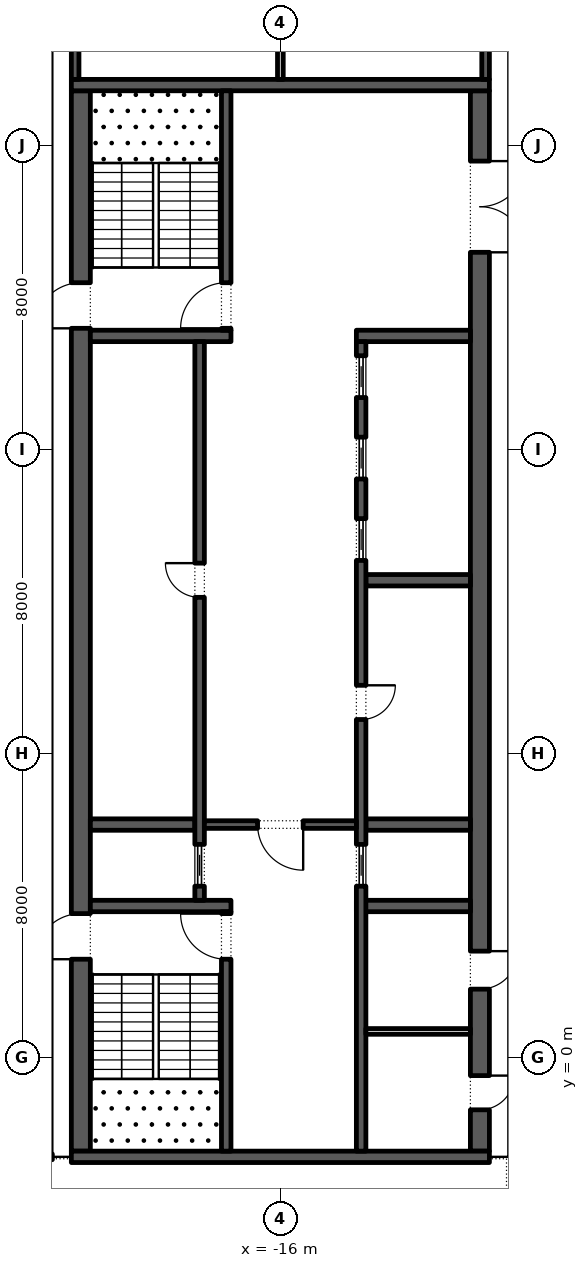
"""IFC4 building model, lengths in metres.
Left out: names, types, materials, properties, quantities, classifications, styles, units other than length and angle.
Written with IfcOpenShell. Run it as: python <this file> out.ifc"""

import sys

from ifc_helpers import new_model, si_unit, direction, frame, frame_2d, origin, place, context, subcontext, project, spatial, rectangle, extrude, element, fill, save


model = new_model("IFC4")
c1 = context("Model", 3, precision=1e-05, world=origin(), true_north=direction((0.0, 1.0)))
c2 = subcontext(c1, "Body", "Model", "MODEL_VIEW")
j1 = project(units=[si_unit("LENGTHUNIT", "METRE"), si_unit("PLANEANGLEUNIT", "RADIAN")], contexts=[c1])
p1 = place(None, origin())
s1 = spatial("IfcSite", under=j1, at=p1, CompositionType="ELEMENT")
p2 = place(p1, origin())
s2 = spatial("IfcBuilding", under=s1, at=p2, CompositionType="ELEMENT")
p3 = place(p2, frame((0.0, 0.0, 330.0)))
s3 = spatial("IfcBuildingStorey", under=s2, at=p3, CompositionType="ELEMENT", Elevation=330.0)
p4 = place(p3, frame((-21.25, -2.45, 0.0), z_axis=(0.0, 0.0, 1.0), x_axis=(0.0, 1.0, 0.0)))
e1 = element("IfcWall", 1, at=p4, inside=s3, PredefinedType="SHEAR", context=c2, shape_type="SweptSolid", body=[
    extrude(rectangle(XDim=27.9, YDim=0.5, at=frame_2d((13.95, 0.0))), origin(), (0.0, 0.0, 1.0), 4.0),
])
p5 = place(p4, frame((5.05, 0.0, 0.0)))
e2 = element("IfcOpeningElement", 2, at=p5, cuts=e1, PredefinedType="OPENING", context=c2, shape_type="SweptSolid", body=[
    extrude(rectangle(XDim=1.2, YDim=2.1, at=frame_2d((0.6, 1.05))), frame((0.0, 0.26, 0.0), z_axis=(0.0, -1.0, 0.0), x_axis=(1.0, 0.0, 0.0)), (0.0, 0.0, 1.0), 0.52),
])
p6 = place(p4, frame((21.65, 0.0, 0.0)))
e3 = element("IfcOpeningElement", 3, at=p6, cuts=e1, PredefinedType="OPENING", context=c2, shape_type="SweptSolid", body=[
    extrude(rectangle(XDim=1.2, YDim=2.1, at=frame_2d((0.6, 1.05))), frame((0.0, 0.26, 0.0), z_axis=(0.0, -1.0, 0.0), x_axis=(1.0, 0.0, 0.0)), (0.0, 0.0, 1.0), 0.52),
])
p7 = place(p3, frame((-10.75, -2.45, 0.0), z_axis=(0.0, 0.0, 1.0), x_axis=(0.0, 1.0, 0.0)))
e4 = element("IfcWall", 4, at=p7, inside=s3, PredefinedType="SHEAR", context=c2, shape_type="SweptSolid", body=[
    extrude(rectangle(XDim=27.9, YDim=0.5, at=frame_2d((13.95, 0.0))), origin(), (0.0, 0.0, 1.0), 4.0),
])
p8 = place(p7, frame((23.65, 0.0, 0.0)))
e5 = element("IfcOpeningElement", 5, at=p8, cuts=e4, PredefinedType="OPENING", context=c2, shape_type="SweptSolid", body=[
    extrude(rectangle(XDim=2.4, YDim=2.1, at=frame_2d((1.2, 1.05))), frame((0.0, 0.26, 0.0), z_axis=(0.0, -1.0, 0.0), x_axis=(1.0, 0.0, 0.0)), (0.0, 0.0, 1.0), 0.52),
])
p9 = place(p7, frame((1.087, 0.0, 0.0)))
e6 = element("IfcOpeningElement", 6, at=p9, cuts=e4, PredefinedType="OPENING", context=c2, shape_type="SweptSolid", body=[
    extrude(rectangle(XDim=0.9, YDim=2.1, at=frame_2d((0.45, 1.05))), frame((0.0, 0.26, 0.0), z_axis=(0.0, -1.0, 0.0), x_axis=(1.0, 0.0, 0.0)), (0.0, 0.0, 1.0), 0.52),
])
p10 = place(p7, frame((4.262, 0.0, 0.0)))
e7 = element("IfcOpeningElement", 7, at=p10, cuts=e4, PredefinedType="OPENING", context=c2, shape_type="SweptSolid", body=[
    extrude(rectangle(XDim=1.0, YDim=2.1, at=frame_2d((0.5, 1.05))), frame((0.0, 0.26, 0.0), z_axis=(0.0, -1.0, 0.0), x_axis=(1.0, 0.0, 0.0)), (0.0, 0.0, 1.0), 0.52),
])
for number, where, z_axis, x_axis in (
    (8, (-21.5, -2.6, 0.0), (0.0, 0.0, 1.0), (1.0, 0.0, 0.0)),
    (9, (-21.5, 25.6, 0.0), (0.0, 0.0, 1.0), (1.0, 0.0, 0.0)),
):
    element("IfcWall", number, at=place(p3, frame(where, z_axis=z_axis, x_axis=x_axis)), inside=s3, PredefinedType="SHEAR", context=c2, shape_type="SweptSolid", body=[
        extrude(rectangle(XDim=11.0, YDim=0.3, at=frame_2d((5.5, 0.0))), origin(), (0.0, 0.0, 1.0), 4.0),
    ])
p11 = place(p3, frame((-21.0, 4.0, 0.0), z_axis=(0.0, 0.0, 1.0), x_axis=(1.0, 0.0, 0.0)))
e10 = element("IfcWall", 10, at=p11, inside=s3, PredefinedType="SHEAR", context=c2, shape_type="SweptSolid", body=[
    extrude(rectangle(XDim=3.7, YDim=0.3, at=frame_2d((1.85, 0.0))), origin(), (0.0, 0.0, 1.0), 4.0),
])
p12 = place(p3, frame((-17.425, -2.45, 0.0), z_axis=(0.0, 0.0, 1.0), x_axis=(0.0, 1.0, 0.0)))
e11 = element("IfcWall", 11, at=p12, inside=s3, PredefinedType="SHEAR", context=c2, shape_type="SweptSolid", body=[
    extrude(rectangle(XDim=6.3, YDim=0.25, at=frame_2d((3.15, 0.0))), origin(), (0.0, 0.0, 1.0), 4.0),
])
p13 = place(p12, frame((5.05, 0.0, 0.0)))
e12 = element("IfcOpeningElement", 12, at=p13, cuts=e11, PredefinedType="OPENING", context=c2, shape_type="SweptSolid", body=[
    extrude(rectangle(XDim=1.2, YDim=2.1, at=frame_2d((0.6, 1.05))), frame((0.0, 0.135, 0.0), z_axis=(0.0, -1.0, 0.0), x_axis=(1.0, 0.0, 0.0)), (0.0, 0.0, 1.0), 0.27),
])
p14 = place(p3, frame((-21.0, 19.0, 0.0), z_axis=(0.0, 0.0, 1.0), x_axis=(1.0, 0.0, 0.0)))
e13 = element("IfcWall", 13, at=p14, inside=s3, PredefinedType="SHEAR", context=c2, shape_type="SweptSolid", body=[
    extrude(rectangle(XDim=3.7, YDim=0.3, at=frame_2d((1.85, 0.0))), origin(), (0.0, 0.0, 1.0), 4.0),
])
p15 = place(p3, frame((-17.425, 19.15, 0.0), z_axis=(0.0, 0.0, 1.0), x_axis=(0.0, 1.0, 0.0)))
e14 = element("IfcWall", 14, at=p15, inside=s3, PredefinedType="SHEAR", context=c2, shape_type="SweptSolid", body=[
    extrude(rectangle(XDim=6.3, YDim=0.25, at=frame_2d((3.15, 0.0))), origin(), (0.0, 0.0, 1.0), 4.0),
])
p16 = place(p15, frame((0.05, 0.0, 0.0)))
e15 = element("IfcOpeningElement", 15, at=p16, cuts=e14, PredefinedType="OPENING", context=c2, shape_type="SweptSolid", body=[
    extrude(rectangle(XDim=1.2, YDim=2.1, at=frame_2d((0.6, 1.05))), frame((0.0, 0.135, 0.0), z_axis=(0.0, -1.0, 0.0), x_axis=(1.0, 0.0, 0.0)), (0.0, 0.0, 1.0), 0.27),
])
p17 = place(p3, frame((-21.0, 6.143, 0.0), z_axis=(0.0, 0.0, 1.0), x_axis=(1.0, 0.0, 0.0)))
e16 = element("IfcWall", 16, at=p17, inside=s3, PredefinedType="SHEAR", context=c2, shape_type="SweptSolid", body=[
    extrude(rectangle(XDim=2.75, YDim=0.3, at=frame_2d((1.375, 0.0))), origin(), (0.0, 0.0, 1.0), 4.0),
])
p18 = place(p3, frame((-18.125, 4.15, 0.0), z_axis=(0.0, 0.0, 1.0), x_axis=(0.0, 1.0, 0.0)))
e17 = element("IfcWall", 17, at=p18, inside=s3, PredefinedType="SHEAR", context=c2, shape_type="SweptSolid", body=[
    extrude(rectangle(XDim=14.7, YDim=0.25, at=frame_2d((7.35, 0.0))), origin(), (0.0, 0.0, 1.0), 4.0),
])
p19 = place(p18, frame((7.971, 0.0, 0.0)))
e18 = element("IfcOpeningElement", 18, at=p19, cuts=e17, PredefinedType="OPENING", context=c2, shape_type="SweptSolid", body=[
    extrude(rectangle(XDim=0.9, YDim=2.1, at=frame_2d((0.45, 1.05))), frame((0.0, 0.135, 0.0), z_axis=(0.0, -1.0, 0.0), x_axis=(1.0, 0.0, 0.0)), (0.0, 0.0, 1.0), 0.27),
])
p20 = place(p18, frame((0.371, 0.0, 0.0)))
e19 = element("IfcOpeningElement", 19, at=p20, cuts=e17, PredefinedType="OPENING", context=c2, shape_type="SweptSolid", body=[
    extrude(rectangle(XDim=1.1, YDim=2.1, at=frame_2d((0.55, 1.05))), frame((0.0, 0.135, 0.0), z_axis=(0.0, -1.0, 0.0), x_axis=(1.0, 0.0, 0.0)), (0.0, 0.0, 1.0), 0.27),
])
p21 = place(p3, frame((-14.0, 4.0, 0.0), z_axis=(0.0, 0.0, 1.0), x_axis=(1.0, 0.0, 0.0)))
e20 = element("IfcWall", 20, at=p21, inside=s3, PredefinedType="SHEAR", context=c2, shape_type="SweptSolid", body=[
    extrude(rectangle(XDim=3.0, YDim=0.3, at=frame_2d((1.5, 0.0))), origin(), (0.0, 0.0, 1.0), 4.0),
])
for number, where, z_axis, x_axis in (
    (21, (-13.75, 6.143, 0.0), (0.0, 0.0, 1.0), (1.0, 0.0, 0.0)),
    (22, (-13.75, 12.571, 0.0), (0.0, 0.0, 1.0), (1.0, 0.0, 0.0)),
):
    element("IfcWall", number, at=place(p3, frame(where, z_axis=z_axis, x_axis=x_axis)), inside=s3, PredefinedType="SHEAR", context=c2, shape_type="SweptSolid", body=[
        extrude(rectangle(XDim=2.75, YDim=0.3, at=frame_2d((1.375, 0.0))), origin(), (0.0, 0.0, 1.0), 4.0),
    ])
p22 = place(p3, frame((-14.0, 19.0, 0.0), z_axis=(0.0, 0.0, 1.0), x_axis=(1.0, 0.0, 0.0)))
e23 = element("IfcWall", 23, at=p22, inside=s3, PredefinedType="SHEAR", context=c2, shape_type="SweptSolid", body=[
    extrude(rectangle(XDim=3.0, YDim=0.3, at=frame_2d((1.5, 0.0))), origin(), (0.0, 0.0, 1.0), 4.0),
])
p23 = place(p3, frame((-13.875, -2.45, 0.0), z_axis=(0.0, 0.0, 1.0), x_axis=(0.0, 1.0, 0.0)))
e24 = element("IfcWall", 24, at=p23, inside=s3, PredefinedType="SHEAR", context=c2, shape_type="SweptSolid", body=[
    extrude(rectangle(XDim=21.3, YDim=0.25, at=frame_2d((10.65, 0.0))), origin(), (0.0, 0.0, 1.0), 4.0),
])
p24 = place(p23, frame((11.357, 0.0, 0.0)))
e25 = element("IfcOpeningElement", 25, at=p24, cuts=e24, PredefinedType="OPENING", context=c2, shape_type="SweptSolid", body=[
    extrude(rectangle(XDim=0.9, YDim=2.1, at=frame_2d((0.45, 1.05))), frame((0.0, 0.135, 0.0), z_axis=(0.0, -1.0, 0.0), x_axis=(1.0, 0.0, 0.0)), (0.0, 0.0, 1.0), 0.27),
])
p25 = place(p23, frame((6.971, 0.0, 0.0)))
e26 = element("IfcOpeningElement", 26, at=p25, cuts=e24, PredefinedType="OPENING", context=c2, shape_type="SweptSolid", body=[
    extrude(rectangle(XDim=1.1, YDim=2.1, at=frame_2d((0.55, 1.05))), frame((0.0, 0.135, 0.0), z_axis=(0.0, -1.0, 0.0), x_axis=(1.0, 0.0, 0.0)), (0.0, 0.0, 1.0), 0.27),
])
p26 = place(p23, frame((15.543, 0.0, 0.0)))
e27 = element("IfcOpeningElement", 27, at=p26, cuts=e24, PredefinedType="OPENING", context=c2, shape_type="SweptSolid", body=[
    extrude(rectangle(XDim=1.1, YDim=2.1, at=frame_2d((0.55, 1.05))), frame((0.0, 0.135, 0.0), z_axis=(0.0, -1.0, 0.0), x_axis=(1.0, 0.0, 0.0)), (0.0, 0.0, 1.0), 0.27),
])
p27 = place(p23, frame((17.686, 0.0, 0.0)))
e28 = element("IfcOpeningElement", 28, at=p27, cuts=e24, PredefinedType="OPENING", context=c2, shape_type="SweptSolid", body=[
    extrude(rectangle(XDim=1.1, YDim=2.1, at=frame_2d((0.55, 1.05))), frame((0.0, 0.135, 0.0), z_axis=(0.0, -1.0, 0.0), x_axis=(1.0, 0.0, 0.0)), (0.0, 0.0, 1.0), 0.27),
])
p28 = place(p23, frame((19.829, 0.0, 0.0)))
e29 = element("IfcOpeningElement", 29, at=p28, cuts=e24, PredefinedType="OPENING", context=c2, shape_type="SweptSolid", body=[
    extrude(rectangle(XDim=1.1, YDim=2.1, at=frame_2d((0.55, 1.05))), frame((0.0, 0.135, 0.0), z_axis=(0.0, -1.0, 0.0), x_axis=(1.0, 0.0, 0.0)), (0.0, 0.0, 1.0), 0.27),
])
p29 = place(p3, frame((-18.0, 6.143, 0.0), z_axis=(0.0, 0.0, 1.0), x_axis=(1.0, 0.0, 0.0)))
e30 = element("IfcWall", 30, at=p29, inside=s3, PredefinedType="SHEAR", context=c2, shape_type="SweptSolid", body=[
    extrude(rectangle(XDim=4.0, YDim=0.2, at=frame_2d((2.0, 0.0))), origin(), (0.0, 0.0, 1.0), 4.0),
])
p30 = place(p29, frame((1.4, 0.0, 0.0)))
e31 = element("IfcOpeningElement", 31, at=p30, cuts=e30, PredefinedType="OPENING", context=c2, shape_type="SweptSolid", body=[
    extrude(rectangle(XDim=1.2, YDim=2.1, at=frame_2d((0.6, 1.05))), frame((0.0, 0.11, 0.0), z_axis=(0.0, -1.0, 0.0), x_axis=(1.0, 0.0, 0.0)), (0.0, 0.0, 1.0), 0.22),
])
p31 = place(p3, frame((-13.75, 0.7, 0.0), z_axis=(0.0, 0.0, 1.0), x_axis=(1.0, 0.0, 0.0)))
e32 = element("IfcWall", 32, at=p31, inside=s3, PredefinedType="PARTITIONING", context=c2, shape_type="SweptSolid", body=[
    extrude(rectangle(XDim=2.75, YDim=0.15, at=frame_2d((1.375, 0.0))), origin(), (0.0, 0.0, 1.0), 4.0),
])
p32 = place(p3, frame((-21.4, 25.75, 0.0), z_axis=(0.0, 0.0, 1.0), x_axis=(0.0, 1.0, 0.0)))
e33 = element("IfcWall", 33, at=p32, inside=s3, PredefinedType="SHEAR", context=c2, shape_type="SweptSolid", body=[
    extrude(rectangle(XDim=15.05, YDim=0.2, at=frame_2d((7.525, 0.0))), origin(), (0.0, 0.0, 1.0), 4.0),
])
p33 = place(p32, frame((7.075, 0.0, 0.0)))
e34 = element("IfcOpeningElement", 34, at=p33, cuts=e33, PredefinedType="OPENING", context=c2, shape_type="SweptSolid", body=[
    extrude(rectangle(XDim=0.9, YDim=2.1, at=frame_2d((0.45, 1.05))), frame((0.0, 0.11, 0.0), z_axis=(0.0, -1.0, 0.0), x_axis=(1.0, 0.0, 0.0)), (0.0, 0.0, 1.0), 0.22),
])
p34 = place(p3, frame((-10.6, 25.75, 0.0), z_axis=(0.0, 0.0, 1.0), x_axis=(0.0, 1.0, 0.0)))
e35 = element("IfcWall", 35, at=p34, inside=s3, PredefinedType="SHEAR", context=c2, shape_type="SweptSolid", body=[
    extrude(rectangle(XDim=15.05, YDim=0.2, at=frame_2d((7.525, 0.0))), origin(), (0.0, 0.0, 1.0), 4.0),
])
p35 = place(p34, frame((3.288, 0.0, 0.0)))
e36 = element("IfcOpeningElement", 36, at=p35, cuts=e35, PredefinedType="OPENING", context=c2, shape_type="SweptSolid", body=[
    extrude(rectangle(XDim=0.9, YDim=2.1, at=frame_2d((0.45, 1.05))), frame((0.0, 0.11, 0.0), z_axis=(0.0, -1.0, 0.0), x_axis=(1.0, 0.0, 0.0)), (0.0, 0.0, 1.0), 0.22),
])
p36 = place(p34, frame((10.887, 0.0, 0.0)))
e37 = element("IfcOpeningElement", 37, at=p36, cuts=e35, PredefinedType="OPENING", context=c2, shape_type="SweptSolid", body=[
    extrude(rectangle(XDim=0.9, YDim=2.1, at=frame_2d((0.45, 1.05))), frame((0.0, 0.11, 0.0), z_axis=(0.0, -1.0, 0.0), x_axis=(1.0, 0.0, 0.0)), (0.0, 0.0, 1.0), 0.22),
])
p37 = place(p3, frame((-16.0, 25.75, 0.0), z_axis=(0.0, 0.0, 1.0), x_axis=(0.0, 1.0, 0.0)))
e38 = element("IfcWall", 38, at=p37, inside=s3, PredefinedType="PARTITIONING", context=c2, shape_type="SweptSolid", body=[
    extrude(rectangle(XDim=15.05, YDim=0.15, at=frame_2d((7.525, 0.0))), origin(), (0.0, 0.0, 1.0), 4.0),
])
p38 = place(p19, origin())
e39 = element("IfcDoor", 39, at=p38, inside=s3, OperationType="SINGLE_SWING_LEFT", PredefinedType="DOOR", context=c2, shape_type="SweptSolid", body=[
    extrude(rectangle(XDim=0.9, YDim=2.1, at=frame_2d((0.45, 1.05))), frame((0.0, 0.125, 0.0), z_axis=(0.0, -1.0, 0.0), x_axis=(1.0, 0.0, 0.0)), (0.0, 0.0, 1.0), 0.05),
])
fill(e18, e39)
p39 = place(p20, origin())
e40 = element("IfcDoor", 40, at=p39, inside=s3, OperationType="SLIDING_TO_LEFT", PredefinedType="DOOR", context=c2, shape_type="SweptSolid", body=[
    extrude(rectangle(XDim=1.1, YDim=2.1, at=frame_2d((0.55, 1.05))), frame((0.0, 0.025, 0.0), z_axis=(0.0, -1.0, 0.0), x_axis=(1.0, 0.0, 0.0)), (0.0, 0.0, 1.0), 0.05),
])
fill(e19, e40)
p40 = place(p24, frame((0.9, -0.2, 0.0), z_axis=(0.0, 0.0, 1.0), x_axis=(-1.0, 0.0, 0.0)))
e41 = element("IfcDoor", 41, at=p40, inside=s3, OperationType="SINGLE_SWING_RIGHT", PredefinedType="DOOR", context=c2, shape_type="SweptSolid", body=[
    extrude(rectangle(XDim=0.9, YDim=2.1, at=frame_2d((0.45, 1.05))), frame((0.0, -0.075, 0.0), z_axis=(0.0, -1.0, 0.0), x_axis=(1.0, 0.0, 0.0)), (0.0, 0.0, 1.0), 0.05),
])
fill(e25, e41)
p41 = place(p25, origin())
e42 = element("IfcDoor", 42, at=p41, inside=s3, OperationType="SLIDING_TO_LEFT", PredefinedType="DOOR", context=c2, shape_type="SweptSolid", body=[
    extrude(rectangle(XDim=1.1, YDim=2.1, at=frame_2d((0.55, 1.05))), frame((0.0, 0.025, 0.0), z_axis=(0.0, -1.0, 0.0), x_axis=(1.0, 0.0, 0.0)), (0.0, 0.0, 1.0), 0.05),
])
fill(e26, e42)
p42 = place(p26, origin())
e43 = element("IfcDoor", 43, at=p42, inside=s3, OperationType="SLIDING_TO_LEFT", PredefinedType="DOOR", context=c2, shape_type="SweptSolid", body=[
    extrude(rectangle(XDim=1.1, YDim=2.1, at=frame_2d((0.55, 1.05))), frame((0.0, 0.025, 0.0), z_axis=(0.0, -1.0, 0.0), x_axis=(1.0, 0.0, 0.0)), (0.0, 0.0, 1.0), 0.05),
])
fill(e27, e43)
p43 = place(p27, origin())
e44 = element("IfcDoor", 44, at=p43, inside=s3, OperationType="SLIDING_TO_LEFT", PredefinedType="DOOR", context=c2, shape_type="SweptSolid", body=[
    extrude(rectangle(XDim=1.1, YDim=2.1, at=frame_2d((0.55, 1.05))), frame((0.0, 0.025, 0.0), z_axis=(0.0, -1.0, 0.0), x_axis=(1.0, 0.0, 0.0)), (0.0, 0.0, 1.0), 0.05),
])
fill(e28, e44)
p44 = place(p28, origin())
e45 = element("IfcDoor", 45, at=p44, inside=s3, OperationType="SLIDING_TO_LEFT", PredefinedType="DOOR", context=c2, shape_type="SweptSolid", body=[
    extrude(rectangle(XDim=1.1, YDim=2.1, at=frame_2d((0.55, 1.05))), frame((0.0, 0.025, 0.0), z_axis=(0.0, -1.0, 0.0), x_axis=(1.0, 0.0, 0.0)), (0.0, 0.0, 1.0), 0.05),
])
fill(e29, e45)
p45 = place(p30, frame((1.2, 0.0, 0.0), z_axis=(0.0, 0.0, 1.0), x_axis=(-1.0, 0.0, 0.0)))
e46 = element("IfcDoor", 46, at=p45, inside=s3, OperationType="SINGLE_SWING_RIGHT", PredefinedType="DOOR", context=c2, shape_type="SweptSolid", body=[
    extrude(rectangle(XDim=1.2, YDim=2.1, at=frame_2d((0.6, 1.05))), frame((0.0, 0.025, 0.0), z_axis=(0.0, -1.0, 0.0), x_axis=(1.0, 0.0, 0.0)), (0.0, 0.0, 1.0), 0.05),
])
fill(e31, e46)
p46 = place(p8, frame((2.4, 0.0, 0.0), z_axis=(0.0, 0.0, 1.0), x_axis=(-1.0, 0.0, 0.0)))
e47 = element("IfcDoor", 47, at=p46, inside=s3, OperationType="DOUBLE_DOOR_SINGLE_SWING", PredefinedType="DOOR", context=c2, shape_type="SweptSolid", body=[
    extrude(rectangle(XDim=2.4, YDim=2.1, at=frame_2d((1.2, 1.05))), frame((0.0, 0.025, 0.0), z_axis=(0.0, -1.0, 0.0), x_axis=(1.0, 0.0, 0.0)), (0.0, 0.0, 1.0), 0.05),
])
fill(e5, e47)
p47 = place(p13, origin())
e48 = element("IfcDoor", 48, at=p47, inside=s3, OperationType="SINGLE_SWING_LEFT", PredefinedType="DOOR", context=c2, shape_type="SweptSolid", body=[
    extrude(rectangle(XDim=1.2, YDim=2.1, at=frame_2d((0.6, 1.05))), frame((0.0, 0.025, 0.0), z_axis=(0.0, -1.0, 0.0), x_axis=(1.0, 0.0, 0.0)), (0.0, 0.0, 1.0), 0.05),
])
fill(e12, e48)
p48 = place(p5, origin())
e49 = element("IfcDoor", 49, at=p48, inside=s3, OperationType="SINGLE_SWING_RIGHT", PredefinedType="DOOR", context=c2, shape_type="SweptSolid", body=[
    extrude(rectangle(XDim=1.2, YDim=2.1, at=frame_2d((0.6, 1.05))), frame((0.0, 0.025, 0.0), z_axis=(0.0, -1.0, 0.0), x_axis=(1.0, 0.0, 0.0)), (0.0, 0.0, 1.0), 0.05),
])
fill(e2, e49)
p49 = place(p16, origin())
e50 = element("IfcDoor", 50, at=p49, inside=s3, OperationType="SINGLE_SWING_RIGHT", PredefinedType="DOOR", context=c2, shape_type="SweptSolid", body=[
    extrude(rectangle(XDim=1.2, YDim=2.1, at=frame_2d((0.6, 1.05))), frame((0.0, 0.025, 0.0), z_axis=(0.0, -1.0, 0.0), x_axis=(1.0, 0.0, 0.0)), (0.0, 0.0, 1.0), 0.05),
])
fill(e15, e50)
p50 = place(p6, origin())
e51 = element("IfcDoor", 51, at=p50, inside=s3, OperationType="SINGLE_SWING_RIGHT", PredefinedType="DOOR", context=c2, shape_type="SweptSolid", body=[
    extrude(rectangle(XDim=1.2, YDim=2.1, at=frame_2d((0.6, 1.05))), frame((0.0, 0.025, 0.0), z_axis=(0.0, -1.0, 0.0), x_axis=(1.0, 0.0, 0.0)), (0.0, 0.0, 1.0), 0.05),
])
fill(e3, e51)
p51 = place(p9, frame((0.9, 0.45, 0.0), z_axis=(0.0, 0.0, 1.0), x_axis=(-1.0, 0.0, 0.0)))
e52 = element("IfcDoor", 52, at=p51, inside=s3, OperationType="SINGLE_SWING_RIGHT", PredefinedType="DOOR", context=c2, shape_type="SweptSolid", body=[
    extrude(rectangle(XDim=0.9, YDim=2.1, at=frame_2d((0.45, 1.05))), frame((0.0, 0.25, 0.0), z_axis=(0.0, -1.0, 0.0), x_axis=(1.0, 0.0, 0.0)), (0.0, 0.0, 1.0), 0.05),
])
fill(e6, e52)
p52 = place(p10, frame((1.0, 0.45, 0.0), z_axis=(0.0, 0.0, 1.0), x_axis=(-1.0, 0.0, 0.0)))
e53 = element("IfcDoor", 53, at=p52, inside=s3, OperationType="SINGLE_SWING_RIGHT", PredefinedType="DOOR", context=c2, shape_type="SweptSolid", body=[
    extrude(rectangle(XDim=1.0, YDim=2.1, at=frame_2d((0.5, 1.05))), frame((0.0, 0.25, 0.0), z_axis=(0.0, -1.0, 0.0), x_axis=(1.0, 0.0, 0.0)), (0.0, 0.0, 1.0), 0.05),
])
fill(e7, e53)
save(model, sys.argv[1])
